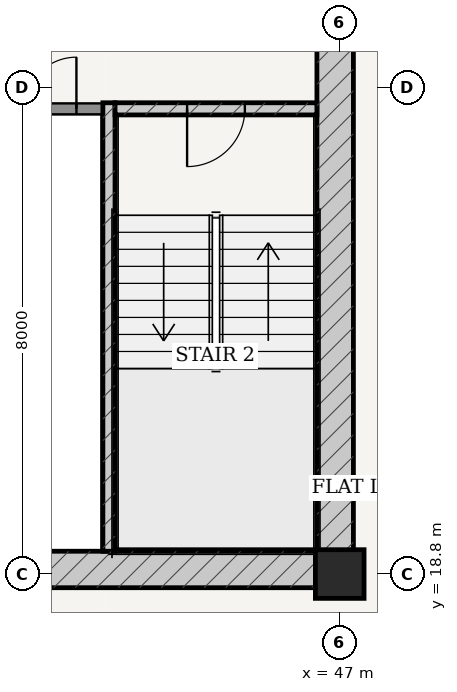
"""IFC4 building model, lengths in metres.
Left out: names, types, materials, properties, quantities, classifications, styles, units other than length and angle.
Written with IfcOpenShell. Run it as: python <this file> out.ifc"""

import sys

from ifc_helpers import new_model, si_unit, direction, frame, frame_2d, origin, origin_2d, place, context, subcontext, project, spatial, rectangle, extrude, source, transform, mapped, element, fill, save


model = new_model("IFC4")
c1 = context("Model", 3, precision=1e-05, world=origin(), true_north=direction((-0.2419218956, 0.970295726276)))
c2 = subcontext(c1, "Body", "Model", "MODEL_VIEW")
j1 = project(units=[si_unit("LENGTHUNIT", "METRE"), si_unit("PLANEANGLEUNIT", "RADIAN")], contexts=[c1])
p1 = place(None, origin())
s1 = spatial("IfcSite", under=j1, at=p1, CompositionType="ELEMENT")
p2 = place(p1, origin())
s2 = spatial("IfcBuilding", under=s1, at=p2, CompositionType="ELEMENT")
p3 = place(p2, frame((0.0, 0.0, 231.9)))
s3 = spatial("IfcBuildingStorey", under=s2, at=p3, CompositionType="ELEMENT", Elevation=231.9)
p4 = place(p3, frame((47.0, 18.8, 0.0), z_axis=(0.0, 0.0, 1.0), x_axis=(1.0, 0.0, 0.0)))
e1 = element("IfcColumn", 1, at=p4, inside=s3, PredefinedType="COLUMN", context=c2, shape_type="SweptSolid", body=[
    extrude(rectangle(XDim=0.8, YDim=0.8, at=origin_2d()), origin(), (0.0, 0.0, 1.0), 3.7),
])
p5 = place(p3, frame((28.775, 18.875, 0.0), z_axis=(0.0, 0.0, 1.0), x_axis=(1.0, 0.0, 0.0)))
e2 = element("IfcWall", 2, at=p5, inside=s3, PredefinedType="SHEAR", context=c2, shape_type="SweptSolid", body=[
    extrude(rectangle(XDim=18.45, YDim=0.6, at=frame_2d((9.225, 0.0))), origin(), (0.0, 0.0, 1.0), 3.435),
])
p6 = place(p5, frame((8.8, 0.0, 0.0)))
e3 = element("IfcOpeningElement", 3, at=p6, cuts=e2, PredefinedType="OPENING", context=c2, shape_type="SweptSolid", body=[
    extrude(rectangle(XDim=0.85, YDim=2.1, at=frame_2d((0.425, 1.05))), frame((0.0, 0.31, 0.0), z_axis=(0.0, -1.0, 0.0), x_axis=(1.0, 0.0, 0.0)), (0.0, 0.0, 1.0), 0.62),
])
p7 = place(p3, frame((46.925, 19.175, 0.0), z_axis=(0.0, 0.0, 1.0), x_axis=(0.0, 1.0, 0.0)))
e4 = element("IfcWall", 4, at=p7, inside=s3, PredefinedType="SHEAR", context=c2, shape_type="SweptSolid", body=[
    extrude(rectangle(XDim=15.25, YDim=0.6, at=frame_2d((7.625, 0.0))), origin(), (0.0, 0.0, 1.0), 3.435),
])
p8 = place(p7, frame((9.875, 0.0, 0.0)))
e5 = element("IfcOpeningElement", 5, at=p8, cuts=e4, PredefinedType="OPENING", context=c2, shape_type="SweptSolid", body=[
    extrude(rectangle(XDim=1.5, YDim=2.2, at=frame_2d((0.75, 1.1))), frame((0.0, 0.31, 0.0), z_axis=(0.0, -1.0, 0.0), x_axis=(1.0, 0.0, 0.0)), (0.0, 0.0, 1.0), 0.62),
])
p9 = place(p3, frame((43.205, 19.175, 0.0), z_axis=(0.0, 0.0, 1.0), x_axis=(0.0, 1.0, 0.0)))
e6 = element("IfcWall", 6, at=p9, inside=s3, PredefinedType="SOLIDWALL", context=c2, shape_type="SweptSolid", body=[
    extrude(rectangle(XDim=7.375, YDim=0.2, at=frame_2d((3.688, 0.0))), origin(), (0.0, 0.0, 1.0), 3.435),
])
p10 = place(p3, frame((43.305, 26.45, 0.0), z_axis=(0.0, 0.0, 1.0), x_axis=(1.0, 0.0, 0.0)))
e7 = element("IfcWall", 7, at=p10, inside=s3, PredefinedType="SOLIDWALL", context=c2, shape_type="SweptSolid", body=[
    extrude(rectangle(XDim=3.32, YDim=0.2, at=frame_2d((1.66, 0.0))), origin(), (0.0, 0.0, 1.0), 3.435),
])
p11 = place(p10, frame((1.185, 0.0, 0.0)))
e8 = element("IfcOpeningElement", 8, at=p11, cuts=e7, PredefinedType="OPENING", context=c2, shape_type="SweptSolid", body=[
    extrude(rectangle(XDim=0.95, YDim=2.15, at=frame_2d((0.475, 1.075))), frame((0.0, 0.11, 0.0), z_axis=(0.0, -1.0, 0.0), x_axis=(1.0, 0.0, 0.0)), (0.0, 0.0, 1.0), 0.22),
])
p12 = place(p3, frame((41.39, 26.45, 0.0), z_axis=(0.0, 0.0, 1.0), x_axis=(1.0, 0.0, 0.0)))
e9 = element("IfcWall", 9, at=p12, inside=s3, PredefinedType="PARTITIONING", context=c2, shape_type="SweptSolid", body=[
    extrude(rectangle(XDim=1.71, YDim=0.18, at=frame_2d((0.855, 0.0))), origin(), (0.0, 0.0, 1.0), 3.435),
])
p13 = place(p12, frame((0.43, 0.0, 0.0)))
e10 = element("IfcOpeningElement", 10, at=p13, cuts=e9, PredefinedType="OPENING", context=c2, shape_type="SweptSolid", body=[
    extrude(rectangle(XDim=0.85, YDim=2.1, at=frame_2d((0.425, 1.05))), frame((0.0, 0.1, 0.0), z_axis=(0.0, -1.0, 0.0), x_axis=(1.0, 0.0, 0.0)), (0.0, 0.0, 1.0), 0.2),
])
m1 = source(origin(), c2, "Body", "SweptSolid", [
    extrude(rectangle(XDim=0.95, YDim=2.15, at=frame_2d((0.475, 1.075))), frame((0.0, 0.025, 0.0), z_axis=(0.0, -1.0, 0.0), x_axis=(1.0, 0.0, 0.0)), (0.0, 0.0, 1.0), 0.05),
])
p14 = place(p11, frame((0.95, 0.0, 0.0), z_axis=(0.0, 0.0, 1.0), x_axis=(-1.0, 0.0, 0.0)))
e11 = element("IfcDoor", 11, at=p14, inside=s3, OperationType="SINGLE_SWING_RIGHT", PredefinedType="DOOR", context=c2, shape_type="MappedRepresentation", body=[
    mapped(m1, transform((0.0, 0.0, 0.0), scale=1.0)),
])
fill(e8, e11)
m2 = source(origin(), c2, "Body", "SweptSolid", [
    extrude(rectangle(XDim=0.85, YDim=2.1, at=frame_2d((0.425, 1.05))), frame((0.0, 0.025, 0.0), z_axis=(0.0, -1.0, 0.0), x_axis=(1.0, 0.0, 0.0)), (0.0, 0.0, 1.0), 0.05),
])
p15 = place(p13, origin())
e12 = element("IfcDoor", 12, at=p15, inside=s3, OperationType="SINGLE_SWING_RIGHT", PredefinedType="DOOR", context=c2, shape_type="MappedRepresentation", body=[
    mapped(m2, transform((0.0, 0.0, 0.0), scale=1.0)),
])
fill(e10, e12)
save(model, sys.argv[1])
